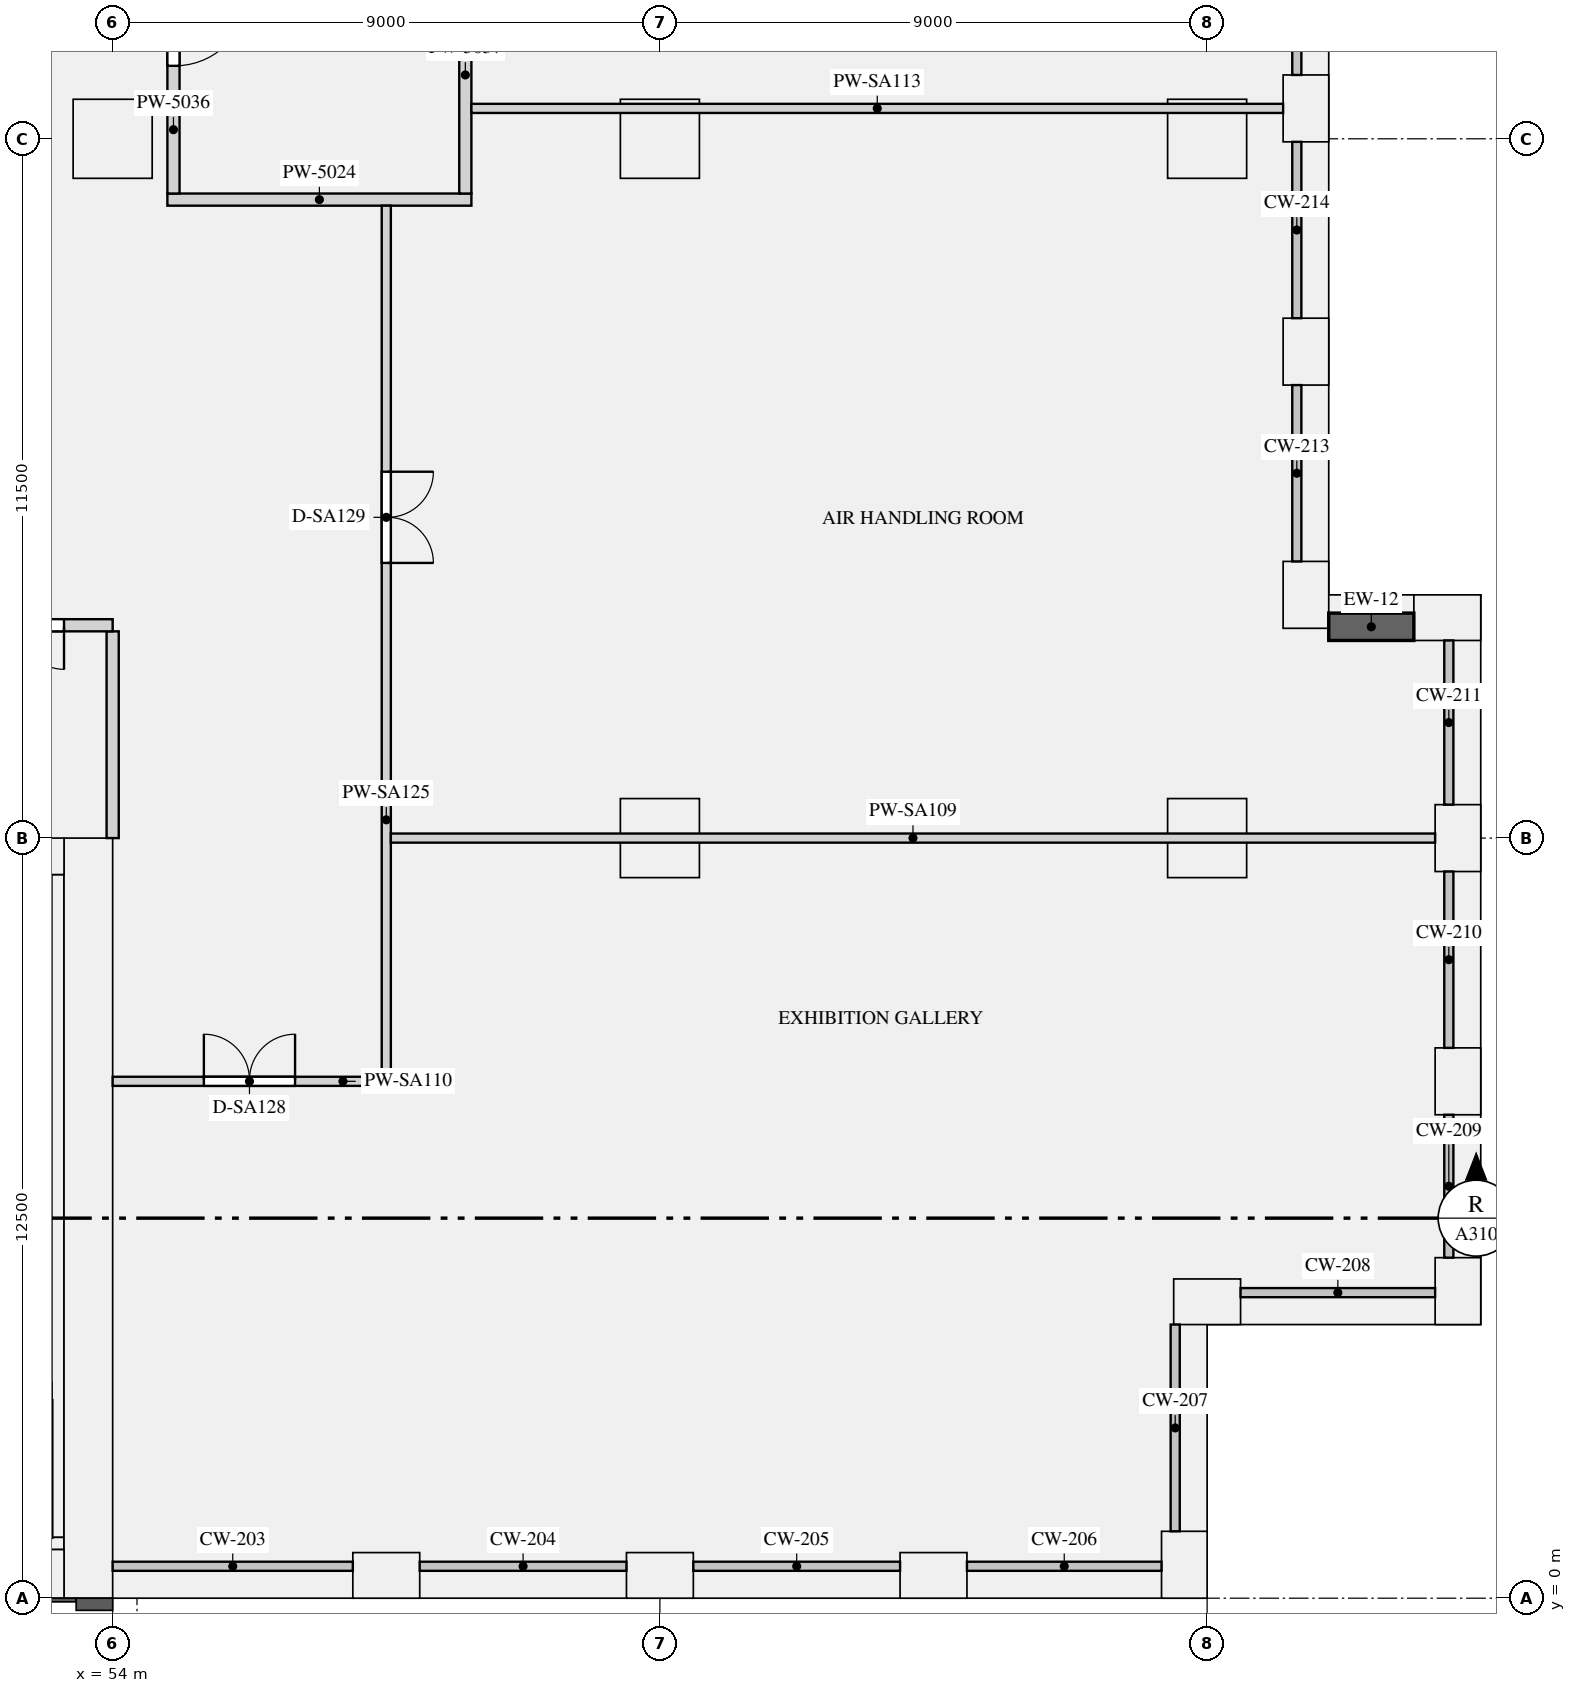
"""IFC4 building model, lengths in metres.
Left out: names, types, materials, properties, quantities, classifications, styles, units other than length and angle.
Written with IfcOpenShell. Run it as: python <this file> out.ifc"""

import sys

from ifc_helpers import new_model, si_unit, direction, frame, frame_2d, origin, origin_2d, place, context, subcontext, project, spatial, rectangle, extrude, element, fill, save


model = new_model("IFC4")
c1 = context("Model", 3, precision=1e-05, world=origin(), true_north=direction((0.0, 1.0)))
c2 = subcontext(c1, "Body", "Model", "MODEL_VIEW")
j1 = project(units=[si_unit("LENGTHUNIT", "METRE"), si_unit("PLANEANGLEUNIT", "RADIAN")], contexts=[c1])
p1 = place(None, origin())
s1 = spatial("IfcSite", under=j1, at=p1, CompositionType="ELEMENT")
p2 = place(p1, origin())
s2 = spatial("IfcBuilding", under=s1, at=p2, CompositionType="ELEMENT")
p3 = place(p2, frame((0.0, 0.0, 77.25)))
s3 = spatial("IfcBuildingStorey", under=s2, at=p3, CompositionType="ELEMENT", Elevation=77.25)
for number, where, z_axis, x_axis in (
    (1, (58.5, 0.375, 0.0), (0.0, 0.0, 1.0), (1.0, 0.0, 0.0)),
    (2, (63.0, 0.375, 0.0), (0.0, 0.0, 1.0), (1.0, 0.0, 0.0)),
    (3, (67.5, 0.375, 0.0), (0.0, 0.0, 1.0), (1.0, 0.0, 0.0)),
    (4, (71.625, 0.55, 0.0), (0.0, 0.0, 1.0), (0.0, 1.0, 0.0)),
    (5, (72.0, 4.875, 0.0), (0.0, 0.0, 1.0), (1.0, 0.0, 0.0)),
    (6, (76.125, 5.05, 0.0), (0.0, 0.0, 1.0), (0.0, 1.0, 0.0)),
    (7, (76.125, 8.5, 0.0), (0.0, 0.0, 1.0), (0.0, 1.0, 0.0)),
    (8, (76.125, 12.5, 0.0), (0.0, 0.0, 1.0), (0.0, 1.0, 0.0)),
    (9, (75.95, 16.125, 0.0), (0.0, 0.0, 1.0), (-1.0, 0.0, 0.0)),
    (10, (73.625, 16.5, 0.0), (0.0, 0.0, 1.0), (0.0, 1.0, 0.0)),
    (11, (73.625, 20.5, 0.0), (0.0, 0.0, 1.0), (0.0, 1.0, 0.0)),
    (12, (73.625, 24.5, 0.0), (0.0, 0.0, 1.0), (0.0, 1.0, 0.0)),
):
    element("IfcColumn", number, at=place(p3, frame(where, z_axis=z_axis, x_axis=x_axis)), inside=s3, PredefinedType="USERDEFINED", context=c2, shape_type="SweptSolid", body=[
        extrude(rectangle(XDim=1.1, YDim=0.75, at=origin_2d()), origin(), (0.0, 0.0, 1.0), 6.3),
    ])
for number, where, z_axis, x_axis in (
    (13, (54.0, 24.0, 0.0), (0.0, 0.0, 1.0), (1.0, 0.0, 0.0)),
    (14, (63.0, 24.0, 0.0), (0.0, 0.0, 1.0), (1.0, 0.0, 0.0)),
    (15, (72.0, 24.0, 0.0), (0.0, 0.0, 1.0), (1.0, 0.0, 0.0)),
    (16, (63.0, 12.5, 0.0), (0.0, 0.0, 1.0), (1.0, 0.0, 0.0)),
    (17, (72.0, 12.5, 0.0), (0.0, 0.0, 1.0), (1.0, 0.0, 0.0)),
):
    element("IfcColumn", number, at=place(p3, frame(where, z_axis=z_axis, x_axis=x_axis)), inside=s3, PredefinedType="COLUMN", context=c2, shape_type="SweptSolid", body=[
        extrude(rectangle(XDim=1.3, YDim=1.3, at=origin_2d()), origin(), (0.0, 0.0, 1.0), 6.3),
    ])
p4 = place(p3, frame((53.6, 0.0, 0.0), z_axis=(0.0, 0.0, 1.0), x_axis=(0.0, 1.0, 0.0)))
e18 = element("IfcWall", 18, at=p4, inside=s3, PredefinedType="SHEAR", context=c2, shape_type="SweptSolid", body=[
    extrude(rectangle(XDim=12.5, YDim=0.8, at=frame_2d((6.25, 0.0))), origin(), (0.0, 0.0, 1.0), 6.3),
])
p5 = place(p3, frame((18.8, 0.4, 0.0), z_axis=(0.0, 0.0, 1.0), x_axis=(1.0, 0.0, 0.0)))
e19 = element("IfcWall", 19, at=p5, inside=s3, PredefinedType="SHEAR", context=c2, shape_type="SweptSolid", body=[
    extrude(rectangle(XDim=34.4, YDim=0.8, at=frame_2d((17.2, 0.0))), origin(), (0.0, 0.0, 1.0), 6.3),
])
p6 = place(p3, frame((18.8, 12.2, 0.0), z_axis=(0.0, 0.0, 1.0), x_axis=(1.0, 0.0, 0.0)))
e20 = element("IfcWall", 20, at=p6, inside=s3, PredefinedType="SHEAR", context=c2, shape_type="SweptSolid", body=[
    extrude(rectangle(XDim=34.4, YDim=0.6, at=frame_2d((17.2, 0.0))), origin(), (0.0, 0.0, 1.0), 6.3),
])
p7 = place(p6, frame((4.675, 0.0, 0.0)))
e21 = element("IfcOpeningElement", 21, at=p7, cuts=e20, PredefinedType="OPENING", context=c2, shape_type="SweptSolid", body=[
    extrude(rectangle(XDim=1.2, YDim=2.1, at=frame_2d((0.6, 1.05))), frame((0.0, 0.31, 0.0), z_axis=(0.0, -1.0, 0.0), x_axis=(1.0, 0.0, 0.0)), (0.0, 0.0, 1.0), 0.62),
])
p8 = place(p6, frame((7.525, 0.0, 0.0)))
e22 = element("IfcOpeningElement", 22, at=p8, cuts=e20, PredefinedType="OPENING", context=c2, shape_type="SweptSolid", body=[
    extrude(rectangle(XDim=1.2, YDim=2.1, at=frame_2d((0.6, 1.05))), frame((0.0, 0.31, 0.0), z_axis=(0.0, -1.0, 0.0), x_axis=(1.0, 0.0, 0.0)), (0.0, 0.0, 1.0), 0.62),
])
p9 = place(p6, frame((10.375, 0.0, 0.0)))
e23 = element("IfcOpeningElement", 23, at=p9, cuts=e20, PredefinedType="OPENING", context=c2, shape_type="SweptSolid", body=[
    extrude(rectangle(XDim=1.2, YDim=2.1, at=frame_2d((0.6, 1.05))), frame((0.0, 0.31, 0.0), z_axis=(0.0, -1.0, 0.0), x_axis=(1.0, 0.0, 0.0)), (0.0, 0.0, 1.0), 0.62),
])
p10 = place(p6, frame((13.225, 0.0, 0.0)))
e24 = element("IfcOpeningElement", 24, at=p10, cuts=e20, PredefinedType="OPENING", context=c2, shape_type="SweptSolid", body=[
    extrude(rectangle(XDim=1.2, YDim=2.1, at=frame_2d((0.6, 1.05))), frame((0.0, 0.31, 0.0), z_axis=(0.0, -1.0, 0.0), x_axis=(1.0, 0.0, 0.0)), (0.0, 0.0, 1.0), 0.62),
])
p11 = place(p6, frame((16.075, 0.0, 0.0)))
e25 = element("IfcOpeningElement", 25, at=p11, cuts=e20, PredefinedType="OPENING", context=c2, shape_type="SweptSolid", body=[
    extrude(rectangle(XDim=1.2, YDim=2.1, at=frame_2d((0.6, 1.05))), frame((0.0, 0.31, 0.0), z_axis=(0.0, -1.0, 0.0), x_axis=(1.0, 0.0, 0.0)), (0.0, 0.0, 1.0), 0.62),
])
p12 = place(p6, frame((18.925, 0.0, 0.0)))
e26 = element("IfcOpeningElement", 26, at=p12, cuts=e20, PredefinedType="OPENING", context=c2, shape_type="SweptSolid", body=[
    extrude(rectangle(XDim=1.2, YDim=2.1, at=frame_2d((0.6, 1.05))), frame((0.0, 0.31, 0.0), z_axis=(0.0, -1.0, 0.0), x_axis=(1.0, 0.0, 0.0)), (0.0, 0.0, 1.0), 0.62),
])
p13 = place(p6, frame((21.775, 0.0, 0.0)))
e27 = element("IfcOpeningElement", 27, at=p13, cuts=e20, PredefinedType="OPENING", context=c2, shape_type="SweptSolid", body=[
    extrude(rectangle(XDim=1.2, YDim=2.1, at=frame_2d((0.6, 1.05))), frame((0.0, 0.31, 0.0), z_axis=(0.0, -1.0, 0.0), x_axis=(1.0, 0.0, 0.0)), (0.0, 0.0, 1.0), 0.62),
])
p14 = place(p6, frame((24.375, 0.0, 0.0)))
e28 = element("IfcOpeningElement", 28, at=p14, cuts=e20, PredefinedType="OPENING", context=c2, shape_type="SweptSolid", body=[
    extrude(rectangle(XDim=1.1, YDim=2.1, at=frame_2d((0.55, 1.05))), frame((0.0, 0.31, 0.0), z_axis=(0.0, -1.0, 0.0), x_axis=(1.0, 0.0, 0.0)), (0.0, 0.0, 1.0), 0.62),
])
p15 = place(p6, frame((26.625, 0.0, 0.0)))
e29 = element("IfcOpeningElement", 29, at=p15, cuts=e20, PredefinedType="OPENING", context=c2, shape_type="SweptSolid", body=[
    extrude(rectangle(XDim=1.1, YDim=2.1, at=frame_2d((0.55, 1.05))), frame((0.0, 0.31, 0.0), z_axis=(0.0, -1.0, 0.0), x_axis=(1.0, 0.0, 0.0)), (0.0, 0.0, 1.0), 0.62),
])
p16 = place(p6, frame((28.875, 0.0, 0.0)))
e30 = element("IfcOpeningElement", 30, at=p16, cuts=e20, PredefinedType="OPENING", context=c2, shape_type="SweptSolid", body=[
    extrude(rectangle(XDim=1.1, YDim=2.1, at=frame_2d((0.55, 1.05))), frame((0.0, 0.31, 0.0), z_axis=(0.0, -1.0, 0.0), x_axis=(1.0, 0.0, 0.0)), (0.0, 0.0, 1.0), 0.62),
])
p17 = place(p6, frame((1.35, 0.0, 0.0)))
e31 = element("IfcOpeningElement", 31, at=p17, cuts=e20, PredefinedType="OPENING", context=c2, shape_type="SweptSolid", body=[
    extrude(rectangle(XDim=1.2, YDim=2.1, at=frame_2d((0.6, 1.05))), frame((0.0, 0.31, 0.0), z_axis=(0.0, -1.0, 0.0), x_axis=(1.0, 0.0, 0.0)), (0.0, 0.0, 1.0), 0.62),
])
p18 = place(p6, frame((31.85, 0.0, 0.0)))
e32 = element("IfcOpeningElement", 32, at=p18, cuts=e20, PredefinedType="OPENING", context=c2, shape_type="SweptSolid", body=[
    extrude(rectangle(XDim=1.2, YDim=2.1, at=frame_2d((0.6, 1.05))), frame((0.0, 0.31, 0.0), z_axis=(0.0, -1.0, 0.0), x_axis=(1.0, 0.0, 0.0)), (0.0, 0.0, 1.0), 0.62),
])
p19 = place(p3, frame((53.1, 1.0, 0.0), z_axis=(0.0, 0.0, 1.0), x_axis=(0.0, 1.0, 0.0)))
e33 = element("IfcWall", 33, at=p19, inside=s3, PredefinedType="SHEAR", context=c2, shape_type="SweptSolid", body=[
    extrude(rectangle(XDim=10.9, YDim=0.2, at=frame_2d((5.45, 0.0))), origin(), (0.0, 0.0, 1.0), 6.3),
])
p20 = place(p3, frame((18.8, 0.9, 0.0), z_axis=(0.0, 0.0, 1.0), x_axis=(1.0, 0.0, 0.0)))
e34 = element("IfcWall", 34, at=p20, inside=s3, PredefinedType="SHEAR", context=c2, shape_type="SweptSolid", body=[
    extrude(rectangle(XDim=34.4, YDim=0.2, at=frame_2d((17.2, 0.0))), origin(), (0.0, 0.0, 1.0), 6.3),
])
p21 = place(p3, frame((75.4, 15.975, 0.9), z_axis=(0.0, 0.0, 1.0), x_axis=(-1.0, 0.0, 0.0)))
e35 = element("IfcWall", 35, at=p21, inside=s3, PredefinedType="SOLIDWALL", context=c2, shape_type="SweptSolid", body=[
    extrude(rectangle(XDim=1.4, YDim=0.45, at=frame_2d((0.7, 0.0))), origin(), (0.0, 0.0, 1.0), 5.08),
])
p22 = place(p3, frame((54.9, 23.0, 0.0), z_axis=(0.0, 0.0, 1.0), x_axis=(1.0, 0.0, 0.0)))
e36 = element("IfcWall", 36, at=p22, inside=s3, PredefinedType="PARTITIONING", context=c2, shape_type="SweptSolid", body=[
    extrude(rectangle(XDim=5.0, YDim=0.2, at=frame_2d((2.5, 0.0))), origin(), (0.0, 0.0, 1.0), 5.98),
])
p23 = place(p3, frame((54.0, 12.5, 0.0), z_axis=(0.0, 0.0, 1.0), x_axis=(0.0, 1.0, 0.0)))
e37 = element("IfcWall", 37, at=p23, inside=s3, PredefinedType="PARTITIONING", context=c2, shape_type="SweptSolid", body=[
    extrude(rectangle(XDim=3.4, YDim=0.2, at=frame_2d((1.7, 0.0))), origin(), (0.0, 0.0, 1.0), 5.98),
])
p24 = place(p3, frame((55.0, 23.1, 0.0), z_axis=(0.0, 0.0, 1.0), x_axis=(0.0, 1.0, 0.0)))
e38 = element("IfcWall", 38, at=p24, inside=s3, PredefinedType="PARTITIONING", context=c2, shape_type="SweptSolid", body=[
    extrude(rectangle(XDim=3.8, YDim=0.2, at=frame_2d((1.9, 0.0))), origin(), (0.0, 0.0, 1.0), 5.98),
])
p25 = place(p24, frame((2.1, 0.0, 0.0)))
e39 = element("IfcOpeningElement", 39, at=p25, cuts=e38, PredefinedType="OPENING", context=c2, shape_type="SweptSolid", body=[
    extrude(rectangle(XDim=1.2, YDim=2.1, at=frame_2d((0.6, 1.05))), frame((0.0, 0.11, 0.0), z_axis=(0.0, -1.0, 0.0), x_axis=(1.0, 0.0, 0.0)), (0.0, 0.0, 1.0), 0.22),
])
p26 = place(p3, frame((59.8, 23.1, 0.0), z_axis=(0.0, 0.0, 1.0), x_axis=(0.0, 1.0, 0.0)))
e40 = element("IfcWall", 40, at=p26, inside=s3, PredefinedType="PARTITIONING", context=c2, shape_type="SweptSolid", body=[
    extrude(rectangle(XDim=3.9, YDim=0.2, at=frame_2d((1.95, 0.0))), origin(), (0.0, 0.0, 1.0), 5.98),
])
p27 = place(p3, frame((58.575, 12.5, 0.0), z_axis=(0.0, 0.0, 1.0), x_axis=(1.0, 0.0, 0.0)))
e41 = element("IfcWall", 41, at=p27, inside=s3, PredefinedType="PARTITIONING", context=c2, shape_type="SweptSolid", body=[
    extrude(rectangle(XDim=17.175, YDim=0.15, at=frame_2d((8.587, 0.0))), origin(), (0.0, 0.0, 1.0), 5.98),
])
p28 = place(p3, frame((54.0, 8.5, 0.0), z_axis=(0.0, 0.0, 1.0), x_axis=(1.0, 0.0, 0.0)))
e42 = element("IfcWall", 42, at=p28, inside=s3, PredefinedType="PARTITIONING", context=c2, shape_type="SweptSolid", body=[
    extrude(rectangle(XDim=4.575, YDim=0.15, at=frame_2d((2.288, 0.0))), origin(), (0.0, 0.0, 1.0), 5.98),
])
p29 = place(p28, frame((1.5, 0.0, 0.0)))
e43 = element("IfcOpeningElement", 43, at=p29, cuts=e42, PredefinedType="OPENING", context=c2, shape_type="SweptSolid", body=[
    extrude(rectangle(XDim=1.5, YDim=2.1, at=frame_2d((0.75, 1.05))), frame((0.0, 0.085, 0.0), z_axis=(0.0, -1.0, 0.0), x_axis=(1.0, 0.0, 0.0)), (0.0, 0.0, 1.0), 0.17),
])
p30 = place(p3, frame((59.9, 24.5, 0.0), z_axis=(0.0, 0.0, 1.0), x_axis=(1.0, 0.0, 0.0)))
e44 = element("IfcWall", 44, at=p30, inside=s3, PredefinedType="PARTITIONING", context=c2, shape_type="SweptSolid", body=[
    extrude(rectangle(XDim=13.35, YDim=0.15, at=frame_2d((6.675, 0.0))), origin(), (0.0, 0.0, 1.0), 5.98),
])
p31 = place(p3, frame((18.0, 16.0, 0.0), z_axis=(0.0, 0.0, 1.0), x_axis=(1.0, 0.0, 0.0)))
e45 = element("IfcWall", 45, at=p31, inside=s3, PredefinedType="PARTITIONING", context=c2, shape_type="SweptSolid", body=[
    extrude(rectangle(XDim=36.0, YDim=0.2, at=frame_2d((18.0, 0.0))), origin(), (0.0, 0.0, 1.0), 5.98),
])
p32 = place(p31, frame((0.8, 0.0, 0.0)))
e46 = element("IfcOpeningElement", 46, at=p32, cuts=e45, PredefinedType="OPENING", context=c2, shape_type="SweptSolid", body=[
    extrude(rectangle(XDim=1.4, YDim=2.1, at=frame_2d((0.7, 1.05))), frame((0.0, 0.11, 0.0), z_axis=(0.0, -1.0, 0.0), x_axis=(1.0, 0.0, 0.0)), (0.0, 0.0, 1.0), 0.22),
])
p33 = place(p31, frame((33.8, 0.0, 0.0)))
e47 = element("IfcOpeningElement", 47, at=p33, cuts=e45, PredefinedType="OPENING", context=c2, shape_type="SweptSolid", body=[
    extrude(rectangle(XDim=1.4, YDim=2.1, at=frame_2d((0.7, 1.05))), frame((0.0, 0.11, 0.0), z_axis=(0.0, -1.0, 0.0), x_axis=(1.0, 0.0, 0.0)), (0.0, 0.0, 1.0), 0.22),
])
p34 = place(p3, frame((58.5, 8.575, 0.0), z_axis=(0.0, 0.0, 1.0), x_axis=(0.0, 1.0, 0.0)))
e48 = element("IfcWall", 48, at=p34, inside=s3, PredefinedType="PARTITIONING", context=c2, shape_type="SweptSolid", body=[
    extrude(rectangle(XDim=14.325, YDim=0.15, at=frame_2d((7.163, 0.0))), origin(), (0.0, 0.0, 1.0), 5.98),
])
p35 = place(p34, frame((8.45, 0.0, 0.0)))
e49 = element("IfcOpeningElement", 49, at=p35, cuts=e48, PredefinedType="OPENING", context=c2, shape_type="SweptSolid", body=[
    extrude(rectangle(XDim=1.5, YDim=2.1, at=frame_2d((0.75, 1.05))), frame((0.0, 0.085, 0.0), z_axis=(0.0, -1.0, 0.0), x_axis=(1.0, 0.0, 0.0)), (0.0, 0.0, 1.0), 0.17),
])
p36 = place(p25, frame((1.2, 0.0, 0.0), z_axis=(0.0, 0.0, 1.0), x_axis=(-1.0, 0.0, 0.0)))
e50 = element("IfcDoor", 50, at=p36, inside=s3, OperationType="SINGLE_SWING_LEFT", PredefinedType="DOOR", context=c2, shape_type="SweptSolid", body=[
    extrude(rectangle(XDim=1.2, YDim=2.1, at=frame_2d((0.6, 1.05))), frame((0.0, 0.025, 0.0), z_axis=(0.0, -1.0, 0.0), x_axis=(1.0, 0.0, 0.0)), (0.0, 0.0, 1.0), 0.05),
])
fill(e39, e50)
p37 = place(p33, frame((1.4, 0.0, 0.0), z_axis=(0.0, 0.0, 1.0), x_axis=(-1.0, 0.0, 0.0)))
e51 = element("IfcDoor", 51, at=p37, inside=s3, OperationType="DOUBLE_DOOR_SINGLE_SWING", PredefinedType="DOOR", context=c2, shape_type="SweptSolid", body=[
    extrude(rectangle(XDim=1.4, YDim=2.1, at=frame_2d((0.7, 1.05))), frame((0.0, 0.025, 0.0), z_axis=(0.0, -1.0, 0.0), x_axis=(1.0, 0.0, 0.0)), (0.0, 0.0, 1.0), 0.05),
])
fill(e47, e51)
p38 = place(p29, origin())
e52 = element("IfcDoor", 52, at=p38, inside=s3, OperationType="DOUBLE_DOOR_SINGLE_SWING", PredefinedType="DOOR", context=c2, shape_type="SweptSolid", body=[
    extrude(rectangle(XDim=1.5, YDim=2.1, at=frame_2d((0.75, 1.05))), frame((0.0, 0.025, 0.0), z_axis=(0.0, -1.0, 0.0), x_axis=(1.0, 0.0, 0.0)), (0.0, 0.0, 1.0), 0.05),
])
fill(e43, e52)
p39 = place(p35, frame((1.5, 0.0, 0.0), z_axis=(0.0, 0.0, 1.0), x_axis=(-1.0, 0.0, 0.0)))
e53 = element("IfcDoor", 53, at=p39, inside=s3, OperationType="DOUBLE_DOOR_SINGLE_SWING", PredefinedType="DOOR", context=c2, shape_type="SweptSolid", body=[
    extrude(rectangle(XDim=1.5, YDim=2.1, at=frame_2d((0.75, 1.05))), frame((0.0, 0.025, 0.0), z_axis=(0.0, -1.0, 0.0), x_axis=(1.0, 0.0, 0.0)), (0.0, 0.0, 1.0), 0.05),
])
fill(e49, e53)
save(model, sys.argv[1])
